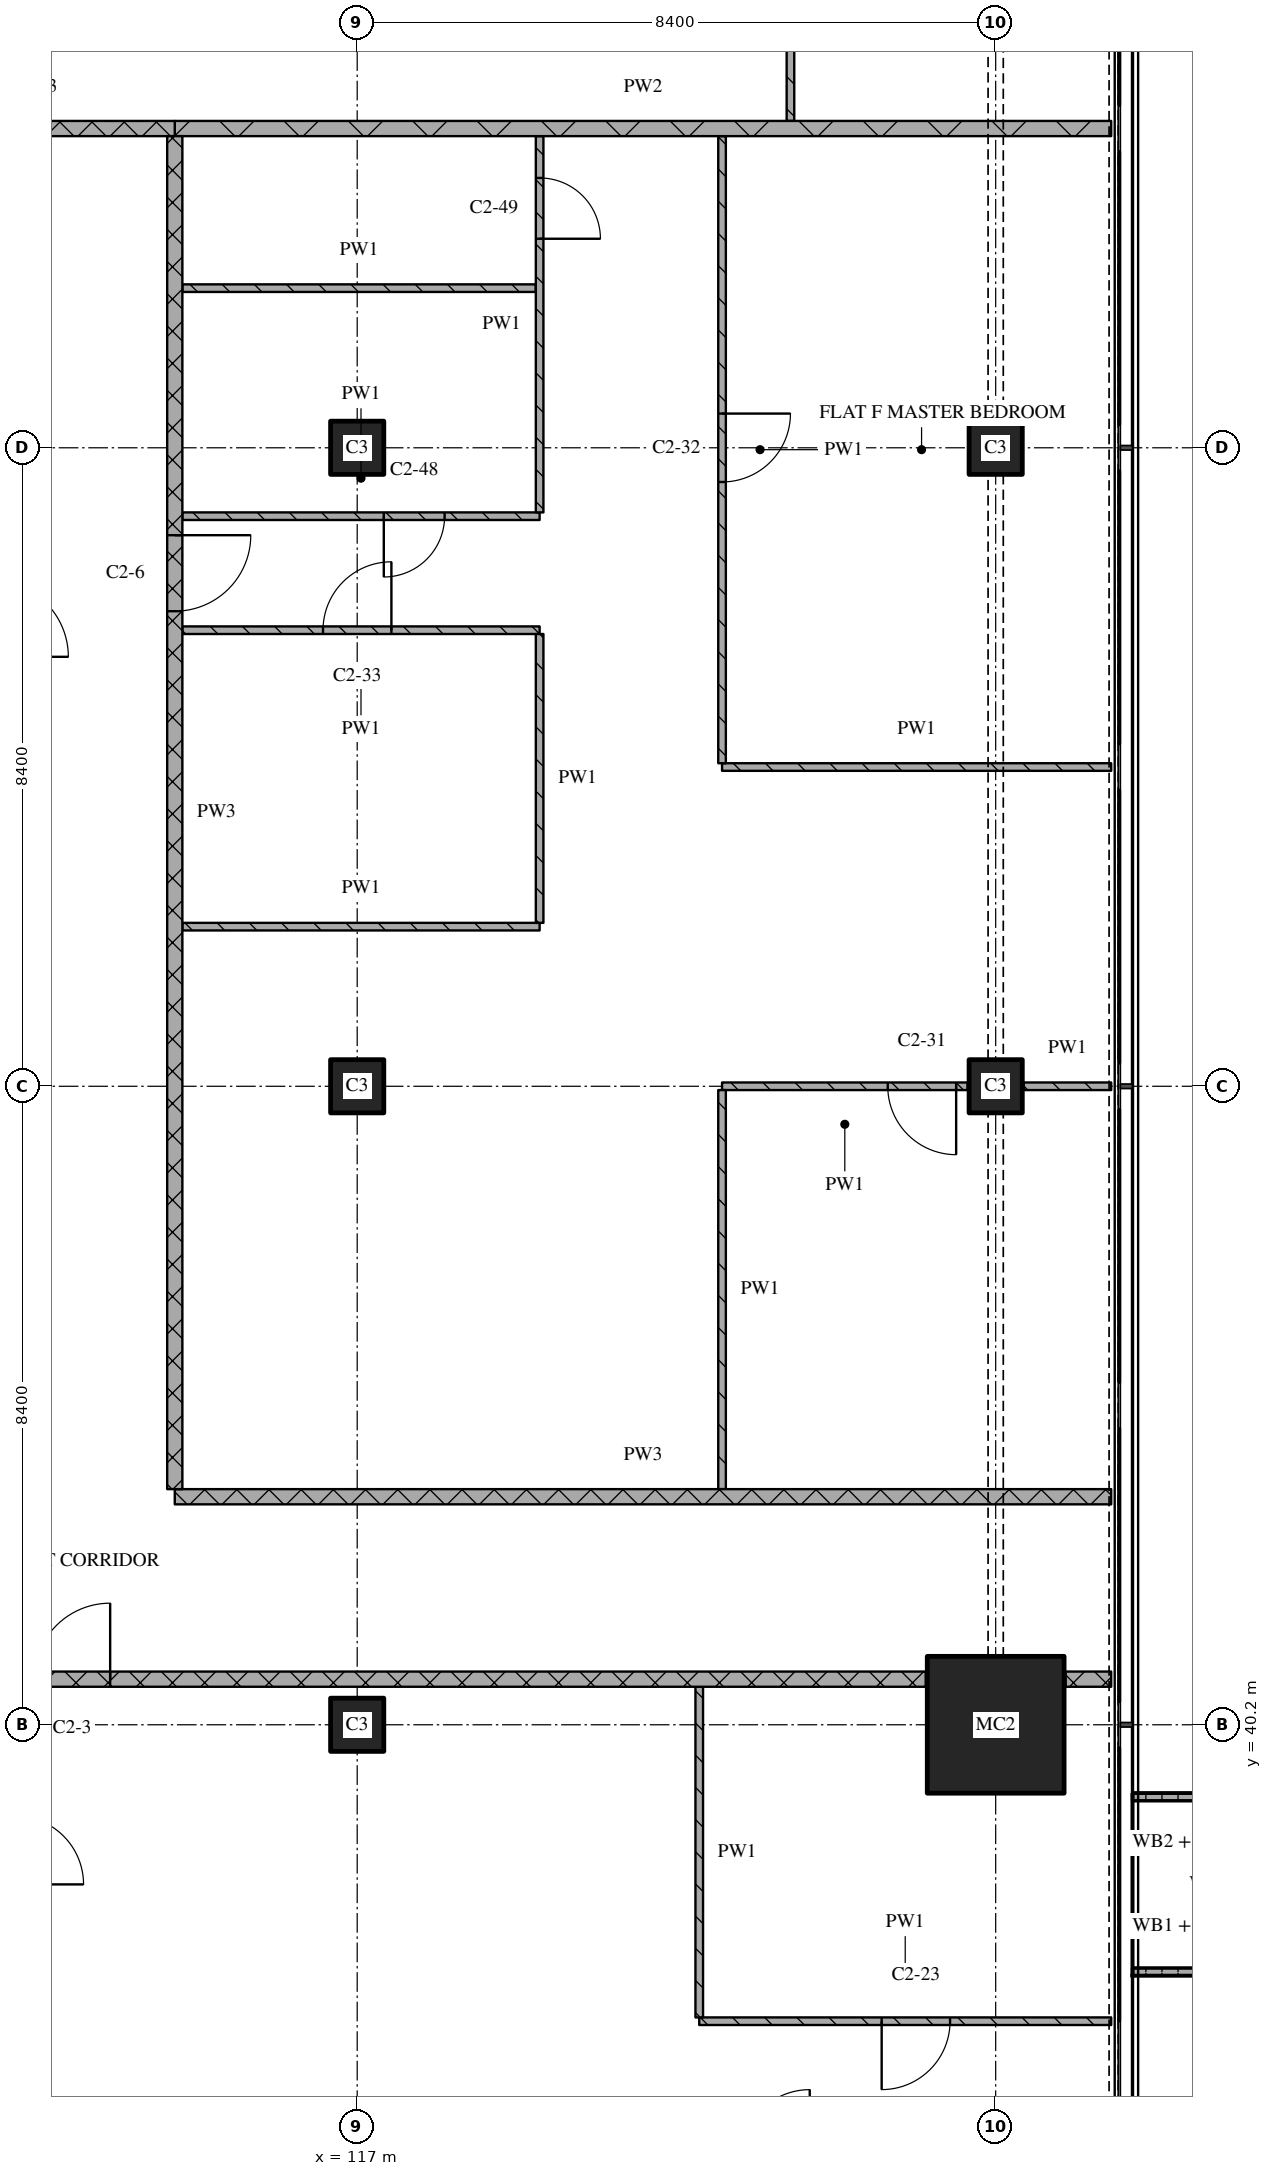
"""IFC4 building model, lengths in metres.
Left out: names, types, materials, properties, quantities, classifications, styles, units other than length and angle.
Written with IfcOpenShell. Run it as: python <this file> out.ifc"""

import sys

from ifc_helpers import new_model, si_unit, direction, frame, frame_2d, origin, origin_2d, place, context, subcontext, project, spatial, polyline, rectangle, outline, extrude, element, fill, save


model = new_model("IFC4")
c1 = context("Model", 3, precision=1e-05, world=origin(), true_north=direction((0.0, 1.0)))
c2 = subcontext(c1, "Body", "Model", "MODEL_VIEW")
j1 = project(units=[si_unit("LENGTHUNIT", "METRE"), si_unit("PLANEANGLEUNIT", "RADIAN")], contexts=[c1])
p1 = place(None, origin())
s1 = spatial("IfcSite", under=j1, at=p1, CompositionType="ELEMENT")
p2 = place(p1, origin())
s2 = spatial("IfcBuilding", under=s1, at=p2, CompositionType="ELEMENT")
p3 = place(p2, frame((0.0, 0.0, 165.45)))
s3 = spatial("IfcBuildingStorey", under=s2, at=p3, CompositionType="ELEMENT", Elevation=165.45)
for number, where, z_axis, x_axis in (
    (1, (117.0, 40.2, 0.0), (0.0, 0.0, 1.0), (1.0, 0.0, 0.0)),
    (2, (117.0, 48.6, 0.0), (0.0, 0.0, 1.0), (1.0, 0.0, 0.0)),
    (3, (117.0, 57.0, 0.0), (0.0, 0.0, 1.0), (1.0, 0.0, 0.0)),
):
    element("IfcColumn", number, at=place(p3, frame(where, z_axis=z_axis, x_axis=x_axis)), inside=s3, PredefinedType="COLUMN", context=c2, shape_type="SweptSolid", body=[
        extrude(rectangle(XDim=0.7, YDim=0.7, at=origin_2d()), origin(), (0.0, 0.0, 1.0), 3.6),
    ])
p4 = place(p3, frame((125.4, 40.2, 0.0), z_axis=(0.0, 0.0, 1.0), x_axis=(1.0, 0.0, 0.0)))
e4 = element("IfcColumn", 4, at=p4, inside=s3, PredefinedType="COLUMN", context=c2, shape_type="SweptSolid", body=[
    extrude(rectangle(XDim=1.8, YDim=1.8, at=origin_2d()), origin(), (0.0, 0.0, 1.0), 3.6),
])
for number, where, z_axis, x_axis in (
    (5, (125.4, 48.6, 0.0), (0.0, 0.0, 1.0), (1.0, 0.0, 0.0)),
    (6, (125.4, 57.0, 0.0), (0.0, 0.0, 1.0), (1.0, 0.0, 0.0)),
):
    element("IfcColumn", number, at=place(p3, frame(where, z_axis=z_axis, x_axis=x_axis)), inside=s3, PredefinedType="COLUMN", context=c2, shape_type="SweptSolid", body=[
        extrude(rectangle(XDim=0.7, YDim=0.7, at=origin_2d()), origin(), (0.0, 0.0, 1.0), 3.6),
    ])
p5 = place(p3, origin())
e7 = element("IfcWall", 7, at=p5, inside=s3, PredefinedType="SOLIDWALL", context=c2, shape_type="SweptSolid", body=[
    extrude(outline(polyline([(127.2, 36.9), (127.2, 37.0), (128.7, 37.0), (128.7, 39.2), (127.2, 39.2), (127.2, 39.3), (128.8, 39.3), (128.8, 36.9), (127.2, 36.9)])), origin(), (0.0, 0.0, 1.0), 1.0),
])
p6 = place(p3, frame((121.5, 36.3, 0.0), z_axis=(0.0, 0.0, 1.0), x_axis=(1.0, 0.0, 0.0)))
e8 = element("IfcWall", 8, at=p6, inside=s3, PredefinedType="PARTITIONING", context=c2, shape_type="SweptSolid", body=[
    extrude(rectangle(XDim=5.42, YDim=0.1, at=frame_2d((2.71, 0.0))), origin(), (0.0, 0.0, 1.0), 3.32),
])
p7 = place(p6, frame((2.4, 0.0, 0.0)))
e9 = element("IfcOpeningElement", 9, at=p7, cuts=e8, PredefinedType="OPENING", context=c2, shape_type="SweptSolid", body=[
    extrude(rectangle(XDim=0.9, YDim=2.1, at=frame_2d((0.45, 1.05))), frame((0.0, 0.06, 0.0), z_axis=(0.0, -1.0, 0.0), x_axis=(1.0, 0.0, 0.0)), (0.0, 0.0, 1.0), 0.12),
])
p8 = place(p3, frame((124.48, 40.8, 0.0), z_axis=(0.0, 0.0, 1.0), x_axis=(-1.0, 0.0, 0.0)))
e10 = element("IfcWall", 10, at=p8, inside=s3, PredefinedType="PARTITIONING", context=c2, shape_type="SweptSolid", body=[
    extrude(rectangle(XDim=24.28, YDim=0.2, at=frame_2d((12.14, 0.0))), origin(), (0.0, 0.0, 1.0), 3.32),
])
p9 = place(p8, frame((10.73, 0.0, 0.0)))
e11 = element("IfcOpeningElement", 11, at=p9, cuts=e10, PredefinedType="OPENING", context=c2, shape_type="SweptSolid", body=[
    extrude(rectangle(XDim=1.0, YDim=2.1, at=frame_2d((0.5, 1.05))), frame((0.0, 0.11, 0.0), z_axis=(0.0, -1.0, 0.0), x_axis=(1.0, 0.0, 0.0)), (0.0, 0.0, 1.0), 0.22),
])
p10 = place(p3, frame((126.32, 40.8, 0.0), z_axis=(0.0, 0.0, 1.0), x_axis=(1.0, 0.0, 0.0)))
e12 = element("IfcWall", 12, at=p10, inside=s3, PredefinedType="PARTITIONING", context=c2, shape_type="SweptSolid", body=[
    extrude(rectangle(XDim=0.6, YDim=0.2, at=frame_2d((0.3, 0.0))), origin(), (0.0, 0.0, 1.0), 3.32),
])
p11 = place(p3, frame((114.6, 43.2, 0.0), z_axis=(0.0, 0.0, 1.0), x_axis=(1.0, 0.0, 0.0)))
e13 = element("IfcWall", 13, at=p11, inside=s3, PredefinedType="PARTITIONING", context=c2, shape_type="SweptSolid", body=[
    extrude(rectangle(XDim=12.32, YDim=0.2, at=frame_2d((6.16, 0.0))), origin(), (0.0, 0.0, 1.0), 3.32),
])
p12 = place(p3, frame((125.03, 48.6, 0.0), z_axis=(0.0, 0.0, 1.0), x_axis=(-1.0, 0.0, 0.0)))
e14 = element("IfcWall", 14, at=p12, inside=s3, PredefinedType="PARTITIONING", context=c2, shape_type="SweptSolid", body=[
    extrude(rectangle(XDim=3.23, YDim=0.1, at=frame_2d((1.615, 0.0))), origin(), (0.0, 0.0, 1.0), 3.32),
])
p13 = place(p12, frame((0.15, 0.0, 0.0)))
e15 = element("IfcOpeningElement", 15, at=p13, cuts=e14, PredefinedType="OPENING", context=c2, shape_type="SweptSolid", body=[
    extrude(rectangle(XDim=0.9, YDim=2.1, at=frame_2d((0.45, 1.05))), frame((0.0, 0.06, 0.0), z_axis=(0.0, -1.0, 0.0), x_axis=(1.0, 0.0, 0.0)), (0.0, 0.0, 1.0), 0.12),
])
p14 = place(p3, frame((125.77, 48.6, 0.0), z_axis=(0.0, 0.0, 1.0), x_axis=(1.0, 0.0, 0.0)))
e16 = element("IfcWall", 16, at=p14, inside=s3, PredefinedType="PARTITIONING", context=c2, shape_type="SweptSolid", body=[
    extrude(rectangle(XDim=1.15, YDim=0.1, at=frame_2d((0.575, 0.0))), origin(), (0.0, 0.0, 1.0), 3.32),
])
p15 = place(p3, frame((114.7, 50.7, 0.0), z_axis=(0.0, 0.0, 1.0), x_axis=(1.0, 0.0, 0.0)))
e17 = element("IfcWall", 17, at=p15, inside=s3, PredefinedType="PARTITIONING", context=c2, shape_type="SweptSolid", body=[
    extrude(rectangle(XDim=4.7, YDim=0.1, at=frame_2d((2.35, 0.0))), origin(), (0.0, 0.0, 1.0), 3.32),
])
p16 = place(p3, frame((121.8, 52.8, 0.0), z_axis=(0.0, 0.0, 1.0), x_axis=(1.0, 0.0, 0.0)))
e18 = element("IfcWall", 18, at=p16, inside=s3, PredefinedType="PARTITIONING", context=c2, shape_type="SweptSolid", body=[
    extrude(rectangle(XDim=5.12, YDim=0.1, at=frame_2d((2.56, 0.0))), origin(), (0.0, 0.0, 1.0), 3.32),
])
p17 = place(p3, frame((119.4, 54.6, 0.0), z_axis=(0.0, 0.0, 1.0), x_axis=(-1.0, 0.0, 0.0)))
e19 = element("IfcWall", 19, at=p17, inside=s3, PredefinedType="PARTITIONING", context=c2, shape_type="SweptSolid", body=[
    extrude(rectangle(XDim=4.7, YDim=0.1, at=frame_2d((2.35, 0.0))), origin(), (0.0, 0.0, 1.0), 3.32),
])
p18 = place(p17, frame((1.95, 0.0, 0.0)))
e20 = element("IfcOpeningElement", 20, at=p18, cuts=e19, PredefinedType="OPENING", context=c2, shape_type="SweptSolid", body=[
    extrude(rectangle(XDim=0.9, YDim=2.1, at=frame_2d((0.45, 1.05))), frame((0.0, 0.06, 0.0), z_axis=(0.0, -1.0, 0.0), x_axis=(1.0, 0.0, 0.0)), (0.0, 0.0, 1.0), 0.12),
])
p19 = place(p3, frame((114.7, 56.1, 0.0), z_axis=(0.0, 0.0, 1.0), x_axis=(1.0, 0.0, 0.0)))
e21 = element("IfcWall", 21, at=p19, inside=s3, PredefinedType="PARTITIONING", context=c2, shape_type="SweptSolid", body=[
    extrude(rectangle(XDim=4.7, YDim=0.1, at=frame_2d((2.35, 0.0))), origin(), (0.0, 0.0, 1.0), 3.32),
])
p20 = place(p19, frame((2.65, 0.0, 0.0)))
e22 = element("IfcOpeningElement", 22, at=p20, cuts=e21, PredefinedType="OPENING", context=c2, shape_type="SweptSolid", body=[
    extrude(rectangle(XDim=0.8, YDim=2.1, at=frame_2d((0.4, 1.05))), frame((0.0, 0.06, 0.0), z_axis=(0.0, -1.0, 0.0), x_axis=(1.0, 0.0, 0.0)), (0.0, 0.0, 1.0), 0.12),
])
p21 = place(p3, frame((114.7, 59.1, 0.0), z_axis=(0.0, 0.0, 1.0), x_axis=(1.0, 0.0, 0.0)))
e23 = element("IfcWall", 23, at=p21, inside=s3, PredefinedType="PARTITIONING", context=c2, shape_type="SweptSolid", body=[
    extrude(rectangle(XDim=4.65, YDim=0.1, at=frame_2d((2.325, 0.0))), origin(), (0.0, 0.0, 1.0), 3.32),
])
p22 = place(p3, frame((111.0, 61.2, 0.0), z_axis=(0.0, 0.0, 1.0), x_axis=(1.0, 0.0, 0.0)))
e24 = element("IfcWall", 24, at=p22, inside=s3, PredefinedType="PARTITIONING", context=c2, shape_type="SweptSolid", body=[
    extrude(rectangle(XDim=3.6, YDim=0.2, at=frame_2d((1.8, 0.0))), origin(), (0.0, 0.0, 1.0), 3.32),
])
p23 = place(p3, frame((114.6, 61.2, 0.0), z_axis=(0.0, 0.0, 1.0), x_axis=(1.0, 0.0, 0.0)))
e25 = element("IfcWall", 25, at=p23, inside=s3, PredefinedType="PARTITIONING", context=c2, shape_type="SweptSolid", body=[
    extrude(rectangle(XDim=12.32, YDim=0.2, at=frame_2d((6.16, 0.0))), origin(), (0.0, 0.0, 1.0), 3.32),
])
p24 = place(p3, frame((114.6, 61.1, 0.0), z_axis=(0.0, 0.0, 1.0), x_axis=(0.0, -1.0, 0.0)))
e26 = element("IfcWall", 26, at=p24, inside=s3, PredefinedType="PARTITIONING", context=c2, shape_type="SweptSolid", body=[
    extrude(rectangle(XDim=17.8, YDim=0.2, at=frame_2d((8.9, 0.0))), origin(), (0.0, 0.0, 1.0), 3.32),
])
p25 = place(p24, frame((5.25, 0.0, 0.0)))
e27 = element("IfcOpeningElement", 27, at=p25, cuts=e26, PredefinedType="OPENING", context=c2, shape_type="SweptSolid", body=[
    extrude(rectangle(XDim=1.0, YDim=2.1, at=frame_2d((0.5, 1.05))), frame((0.0, 0.11, 0.0), z_axis=(0.0, -1.0, 0.0), x_axis=(1.0, 0.0, 0.0)), (0.0, 0.0, 1.0), 0.22),
])
p26 = place(p3, frame((119.4, 54.55, 0.0), z_axis=(0.0, 0.0, 1.0), x_axis=(0.0, -1.0, 0.0)))
e28 = element("IfcWall", 28, at=p26, inside=s3, PredefinedType="PARTITIONING", context=c2, shape_type="SweptSolid", body=[
    extrude(rectangle(XDim=3.8, YDim=0.1, at=frame_2d((1.9, 0.0))), origin(), (0.0, 0.0, 1.0), 3.32),
])
p27 = place(p3, frame((119.4, 56.15, 0.0), z_axis=(0.0, 0.0, 1.0), x_axis=(0.0, 1.0, 0.0)))
e29 = element("IfcWall", 29, at=p27, inside=s3, PredefinedType="PARTITIONING", context=c2, shape_type="SweptSolid", body=[
    extrude(rectangle(XDim=4.95, YDim=0.1, at=frame_2d((2.475, 0.0))), origin(), (0.0, 0.0, 1.0), 3.32),
])
p28 = place(p27, frame((3.6, 0.0, 0.0)))
e30 = element("IfcOpeningElement", 30, at=p28, cuts=e29, PredefinedType="OPENING", context=c2, shape_type="SweptSolid", body=[
    extrude(rectangle(XDim=0.8, YDim=2.1, at=frame_2d((0.4, 1.05))), frame((0.0, 0.06, 0.0), z_axis=(0.0, -1.0, 0.0), x_axis=(1.0, 0.0, 0.0)), (0.0, 0.0, 1.0), 0.12),
])
p29 = place(p3, frame((121.5, 40.7, 0.0), z_axis=(0.0, 0.0, 1.0), x_axis=(0.0, -1.0, 0.0)))
e31 = element("IfcWall", 31, at=p29, inside=s3, PredefinedType="PARTITIONING", context=c2, shape_type="SweptSolid", body=[
    extrude(rectangle(XDim=4.35, YDim=0.1, at=frame_2d((2.175, 0.0))), origin(), (0.0, 0.0, 1.0), 3.32),
])
p30 = place(p3, frame((121.8, 48.55, 0.0), z_axis=(0.0, 0.0, 1.0), x_axis=(0.0, -1.0, 0.0)))
e32 = element("IfcWall", 32, at=p30, inside=s3, PredefinedType="PARTITIONING", context=c2, shape_type="SweptSolid", body=[
    extrude(rectangle(XDim=5.25, YDim=0.1, at=frame_2d((2.625, 0.0))), origin(), (0.0, 0.0, 1.0), 3.32),
])
p31 = place(p3, frame((121.8, 61.1, 0.0), z_axis=(0.0, 0.0, 1.0), x_axis=(0.0, -1.0, 0.0)))
e33 = element("IfcWall", 33, at=p31, inside=s3, PredefinedType="PARTITIONING", context=c2, shape_type="SweptSolid", body=[
    extrude(rectangle(XDim=8.25, YDim=0.1, at=frame_2d((4.125, 0.0))), origin(), (0.0, 0.0, 1.0), 3.32),
])
p32 = place(p31, frame((3.65, 0.0, 0.0)))
e34 = element("IfcOpeningElement", 34, at=p32, cuts=e33, PredefinedType="OPENING", context=c2, shape_type="SweptSolid", body=[
    extrude(rectangle(XDim=0.9, YDim=2.1, at=frame_2d((0.45, 1.05))), frame((0.0, 0.06, 0.0), z_axis=(0.0, -1.0, 0.0), x_axis=(1.0, 0.0, 0.0)), (0.0, 0.0, 1.0), 0.12),
])
p33 = place(p3, frame((122.7, 65.35, 0.0), z_axis=(0.0, 0.0, 1.0), x_axis=(0.0, -1.0, 0.0)))
e35 = element("IfcWall", 35, at=p33, inside=s3, PredefinedType="PARTITIONING", context=c2, shape_type="SweptSolid", body=[
    extrude(rectangle(XDim=4.05, YDim=0.1, at=frame_2d((2.025, 0.0))), origin(), (0.0, 0.0, 1.0), 3.32),
])
p34 = place(p7, origin())
e36 = element("IfcDoor", 36, at=p34, inside=s3, OperationType="SINGLE_SWING_RIGHT", PredefinedType="DOOR", context=c2, shape_type="SweptSolid", body=[
    extrude(rectangle(XDim=0.9, YDim=2.1, at=frame_2d((0.45, 1.05))), frame((0.0, 0.025, 0.0), z_axis=(0.0, -1.0, 0.0), x_axis=(1.0, 0.0, 0.0)), (0.0, 0.0, 1.0), 0.05),
])
fill(e9, e36)
p35 = place(p9, origin())
e37 = element("IfcDoor", 37, at=p35, inside=s3, OperationType="SINGLE_SWING_RIGHT", PredefinedType="DOOR", context=c2, shape_type="SweptSolid", body=[
    extrude(rectangle(XDim=1.0, YDim=2.1, at=frame_2d((0.5, 1.05))), frame((0.0, 0.025, 0.0), z_axis=(0.0, -1.0, 0.0), x_axis=(1.0, 0.0, 0.0)), (0.0, 0.0, 1.0), 0.05),
])
fill(e11, e37)
p36 = place(p13, origin())
e38 = element("IfcDoor", 38, at=p36, inside=s3, OperationType="SINGLE_SWING_LEFT", PredefinedType="DOOR", context=c2, shape_type="SweptSolid", body=[
    extrude(rectangle(XDim=0.9, YDim=2.1, at=frame_2d((0.45, 1.05))), frame((0.0, 0.025, 0.0), z_axis=(0.0, -1.0, 0.0), x_axis=(1.0, 0.0, 0.0)), (0.0, 0.0, 1.0), 0.05),
])
fill(e15, e38)
p37 = place(p18, origin())
e39 = element("IfcDoor", 39, at=p37, inside=s3, OperationType="SINGLE_SWING_RIGHT", PredefinedType="DOOR", context=c2, shape_type="SweptSolid", body=[
    extrude(rectangle(XDim=0.9, YDim=2.1, at=frame_2d((0.45, 1.05))), frame((0.0, 0.025, 0.0), z_axis=(0.0, -1.0, 0.0), x_axis=(1.0, 0.0, 0.0)), (0.0, 0.0, 1.0), 0.05),
])
fill(e20, e39)
p38 = place(p20, origin())
e40 = element("IfcDoor", 40, at=p38, inside=s3, OperationType="SINGLE_SWING_RIGHT", PredefinedType="DOOR", context=c2, shape_type="SweptSolid", body=[
    extrude(rectangle(XDim=0.8, YDim=2.1, at=frame_2d((0.4, 1.05))), frame((0.0, 0.025, 0.0), z_axis=(0.0, -1.0, 0.0), x_axis=(1.0, 0.0, 0.0)), (0.0, 0.0, 1.0), 0.05),
])
fill(e22, e40)
p39 = place(p25, origin())
e41 = element("IfcDoor", 41, at=p39, inside=s3, OperationType="SINGLE_SWING_LEFT", PredefinedType="DOOR", context=c2, shape_type="SweptSolid", body=[
    extrude(rectangle(XDim=1.0, YDim=2.1, at=frame_2d((0.5, 1.05))), frame((0.0, 0.025, 0.0), z_axis=(0.0, -1.0, 0.0), x_axis=(1.0, 0.0, 0.0)), (0.0, 0.0, 1.0), 0.05),
])
fill(e27, e41)
p40 = place(p28, origin())
e42 = element("IfcDoor", 42, at=p40, inside=s3, OperationType="SINGLE_SWING_RIGHT", PredefinedType="DOOR", context=c2, shape_type="SweptSolid", body=[
    extrude(rectangle(XDim=0.8, YDim=2.1, at=frame_2d((0.4, 1.05))), frame((0.0, 0.025, 0.0), z_axis=(0.0, -1.0, 0.0), x_axis=(1.0, 0.0, 0.0)), (0.0, 0.0, 1.0), 0.05),
])
fill(e30, e42)
p41 = place(p32, origin())
e43 = element("IfcDoor", 43, at=p41, inside=s3, OperationType="SINGLE_SWING_LEFT", PredefinedType="DOOR", context=c2, shape_type="SweptSolid", body=[
    extrude(rectangle(XDim=0.9, YDim=2.1, at=frame_2d((0.45, 1.05))), frame((0.0, 0.025, 0.0), z_axis=(0.0, -1.0, 0.0), x_axis=(1.0, 0.0, 0.0)), (0.0, 0.0, 1.0), 0.05),
])
fill(e34, e43)
save(model, sys.argv[1])
